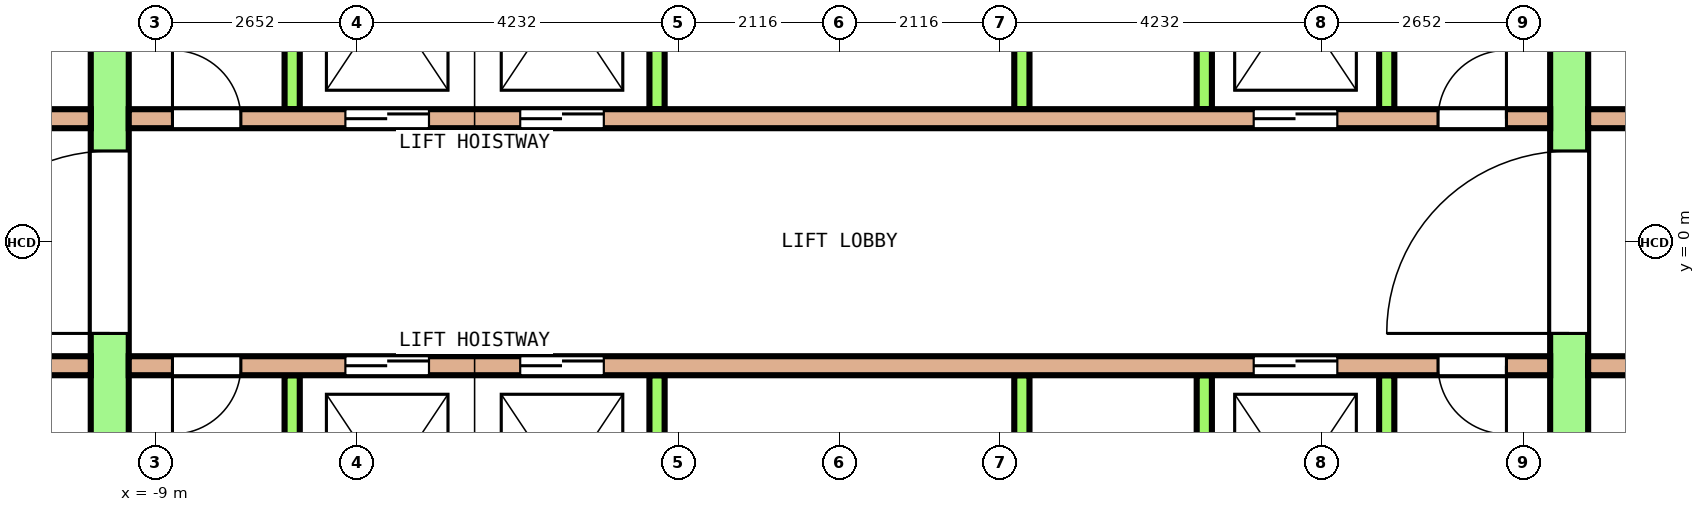
"""IFC4 building model, lengths in metres.
Left out: names, types, materials, properties, quantities, classifications, styles, units other than length and angle.
Written with IfcOpenShell. Run it as: python <this file> out.ifc"""

import sys

from ifc_helpers import new_model, si_unit, direction, frame, frame_2d, origin, place, context, subcontext, project, spatial, rectangle, extrude, element, fill, save


model = new_model("IFC4")
c1 = context("Model", 3, precision=1e-05, world=origin(), true_north=direction((0.0, 1.0)))
c2 = subcontext(c1, "Body", "Model", "MODEL_VIEW")
j1 = project(units=[si_unit("LENGTHUNIT", "METRE"), si_unit("PLANEANGLEUNIT", "RADIAN")], contexts=[c1])
p1 = place(None, origin())
s1 = spatial("IfcSite", under=j1, at=p1, CompositionType="ELEMENT")
p2 = place(p1, origin())
s2 = spatial("IfcBuilding", under=s1, at=p2, CompositionType="ELEMENT")
p3 = place(p2, frame((0.0, 0.0, 176.0)))
s3 = spatial("IfcBuildingStorey", under=s2, at=p3, CompositionType="ELEMENT", Elevation=176.0)
p4 = place(p3, frame((-9.6, -7.75, 0.0), z_axis=(0.0, 0.0, 1.0), x_axis=(0.0, 1.0, 0.0)))
e1 = element("IfcWall", 1, at=p4, inside=s3, PredefinedType="SHEAR", context=c2, shape_type="SweptSolid", body=[
    extrude(rectangle(XDim=15.5, YDim=0.5, at=frame_2d((7.75, 0.0))), origin(), (0.0, 0.0, 1.0), 4.1),
])
p5 = place(p4, frame((6.55, 0.0, 0.0)))
e2 = element("IfcOpeningElement", 2, at=p5, cuts=e1, PredefinedType="OPENING", context=c2, shape_type="SweptSolid", body=[
    extrude(rectangle(XDim=2.4, YDim=2.1, at=frame_2d((1.2, 1.05))), frame((0.0, 0.26, 0.0), z_axis=(0.0, -1.0, 0.0), x_axis=(1.0, 0.0, 0.0)), (0.0, 0.0, 1.0), 0.52),
])
p6 = place(p4, frame((13.45, 0.0, 0.0)))
e3 = element("IfcOpeningElement", 3, at=p6, cuts=e1, PredefinedType="OPENING", context=c2, shape_type="SweptSolid", body=[
    extrude(rectangle(XDim=1.2, YDim=2.1, at=frame_2d((0.6, 1.05))), frame((0.0, 0.26, 0.0), z_axis=(0.0, -1.0, 0.0), x_axis=(1.0, 0.0, 0.0)), (0.0, 0.0, 1.0), 0.52),
])
p7 = place(p4, frame((0.85, 0.0, 0.0)))
e4 = element("IfcOpeningElement", 4, at=p7, cuts=e1, PredefinedType="OPENING", context=c2, shape_type="SweptSolid", body=[
    extrude(rectangle(XDim=1.2, YDim=2.1, at=frame_2d((0.6, 1.05))), frame((0.0, 0.26, 0.0), z_axis=(0.0, -1.0, 0.0), x_axis=(1.0, 0.0, 0.0)), (0.0, 0.0, 1.0), 0.52),
])
p8 = place(p3, frame((9.6, -7.75, 0.0), z_axis=(0.0, 0.0, 1.0), x_axis=(0.0, 1.0, 0.0)))
e5 = element("IfcWall", 5, at=p8, inside=s3, PredefinedType="SHEAR", context=c2, shape_type="SweptSolid", body=[
    extrude(rectangle(XDim=15.5, YDim=0.5, at=frame_2d((7.75, 0.0))), origin(), (0.0, 0.0, 1.0), 4.1),
])
p9 = place(p8, frame((6.55, 0.0, 0.0)))
e6 = element("IfcOpeningElement", 6, at=p9, cuts=e5, PredefinedType="OPENING", context=c2, shape_type="SweptSolid", body=[
    extrude(rectangle(XDim=2.4, YDim=2.1, at=frame_2d((1.2, 1.05))), frame((0.0, 0.26, 0.0), z_axis=(0.0, -1.0, 0.0), x_axis=(1.0, 0.0, 0.0)), (0.0, 0.0, 1.0), 0.52),
])
p10 = place(p8, frame((13.45, 0.0, 0.0)))
e7 = element("IfcOpeningElement", 7, at=p10, cuts=e5, PredefinedType="OPENING", context=c2, shape_type="SweptSolid", body=[
    extrude(rectangle(XDim=1.2, YDim=2.1, at=frame_2d((0.6, 1.05))), frame((0.0, 0.26, 0.0), z_axis=(0.0, -1.0, 0.0), x_axis=(1.0, 0.0, 0.0)), (0.0, 0.0, 1.0), 0.52),
])
p11 = place(p8, frame((0.95, 0.0, 0.0)))
e8 = element("IfcOpeningElement", 8, at=p11, cuts=e5, PredefinedType="OPENING", context=c2, shape_type="SweptSolid", body=[
    extrude(rectangle(XDim=1.0, YDim=2.1, at=frame_2d((0.5, 1.05))), frame((0.0, 0.26, 0.0), z_axis=(0.0, -1.0, 0.0), x_axis=(1.0, 0.0, 0.0)), (0.0, 0.0, 1.0), 0.52),
])
p12 = place(p3, frame((-12.85, 1.625, 0.0), z_axis=(0.0, 0.0, 1.0), x_axis=(1.0, 0.0, 0.0)))
e9 = element("IfcWall", 9, at=p12, inside=s3, PredefinedType="SOLIDWALL", context=c2, shape_type="SweptSolid", body=[
    extrude(rectangle(XDim=3.0, YDim=0.25, at=frame_2d((1.5, 0.0))), origin(), (0.0, 0.0, 1.0), 4.1),
])
p13 = place(p12, frame((1.05, 0.0, 0.0)))
e10 = element("IfcOpeningElement", 10, at=p13, cuts=e9, PredefinedType="OPENING", context=c2, shape_type="SweptSolid", body=[
    extrude(rectangle(XDim=0.9, YDim=2.1, at=frame_2d((0.45, 1.05))), frame((0.0, 0.135, 0.0), z_axis=(0.0, -1.0, 0.0), x_axis=(1.0, 0.0, 0.0)), (0.0, 0.0, 1.0), 0.27),
])
p14 = place(p3, frame((-9.35, 1.625, 0.0), z_axis=(0.0, 0.0, 1.0), x_axis=(1.0, 0.0, 0.0)))
e11 = element("IfcWall", 11, at=p14, inside=s3, PredefinedType="SOLIDWALL", context=c2, shape_type="SweptSolid", body=[
    extrude(rectangle(XDim=18.7, YDim=0.25, at=frame_2d((9.35, 0.0))), origin(), (0.0, 0.0, 1.0), 4.1),
])
p15 = place(p14, frame((2.85, 0.0, 0.0)))
e12 = element("IfcOpeningElement", 12, at=p15, cuts=e11, PredefinedType="OPENING", context=c2, shape_type="SweptSolid", body=[
    extrude(rectangle(XDim=1.1, YDim=2.1, at=frame_2d((0.55, 1.05))), frame((0.0, 0.135, 0.0), z_axis=(0.0, -1.0, 0.0), x_axis=(1.0, 0.0, 0.0)), (0.0, 0.0, 1.0), 0.27),
])
p16 = place(p14, frame((5.15, 0.0, 0.0)))
e13 = element("IfcOpeningElement", 13, at=p16, cuts=e11, PredefinedType="OPENING", context=c2, shape_type="SweptSolid", body=[
    extrude(rectangle(XDim=1.1, YDim=2.1, at=frame_2d((0.55, 1.05))), frame((0.0, 0.135, 0.0), z_axis=(0.0, -1.0, 0.0), x_axis=(1.0, 0.0, 0.0)), (0.0, 0.0, 1.0), 0.27),
])
p17 = place(p14, frame((14.8, 0.0, 0.0)))
e14 = element("IfcOpeningElement", 14, at=p17, cuts=e11, PredefinedType="OPENING", context=c2, shape_type="SweptSolid", body=[
    extrude(rectangle(XDim=1.1, YDim=2.1, at=frame_2d((0.55, 1.05))), frame((0.0, 0.135, 0.0), z_axis=(0.0, -1.0, 0.0), x_axis=(1.0, 0.0, 0.0)), (0.0, 0.0, 1.0), 0.27),
])
p18 = place(p14, frame((0.575, 0.0, 0.0)))
e15 = element("IfcOpeningElement", 15, at=p18, cuts=e11, PredefinedType="OPENING", context=c2, shape_type="SweptSolid", body=[
    extrude(rectangle(XDim=0.9, YDim=2.1, at=frame_2d((0.45, 1.05))), frame((0.0, 0.135, 0.0), z_axis=(0.0, -1.0, 0.0), x_axis=(1.0, 0.0, 0.0)), (0.0, 0.0, 1.0), 0.27),
])
p19 = place(p14, frame((17.225, 0.0, 0.0)))
e16 = element("IfcOpeningElement", 16, at=p19, cuts=e11, PredefinedType="OPENING", context=c2, shape_type="SweptSolid", body=[
    extrude(rectangle(XDim=0.9, YDim=2.1, at=frame_2d((0.45, 1.05))), frame((0.0, 0.135, 0.0), z_axis=(0.0, -1.0, 0.0), x_axis=(1.0, 0.0, 0.0)), (0.0, 0.0, 1.0), 0.27),
])
p20 = place(p3, frame((9.85, 1.625, 0.0), z_axis=(0.0, 0.0, 1.0), x_axis=(1.0, 0.0, 0.0)))
e17 = element("IfcWall", 17, at=p20, inside=s3, PredefinedType="SOLIDWALL", context=c2, shape_type="SweptSolid", body=[
    extrude(rectangle(XDim=3.0, YDim=0.25, at=frame_2d((1.5, 0.0))), origin(), (0.0, 0.0, 1.0), 4.1),
])
p21 = place(p20, frame((1.05, 0.0, 0.0)))
e18 = element("IfcOpeningElement", 18, at=p21, cuts=e17, PredefinedType="OPENING", context=c2, shape_type="SweptSolid", body=[
    extrude(rectangle(XDim=0.9, YDim=2.1, at=frame_2d((0.45, 1.05))), frame((0.0, 0.135, 0.0), z_axis=(0.0, -1.0, 0.0), x_axis=(1.0, 0.0, 0.0)), (0.0, 0.0, 1.0), 0.27),
])
for number, where, z_axis, x_axis in (
    (19, (-7.2, 1.75, 0.0), (0.0, 0.0, 1.0), (0.0, 1.0, 0.0)),
    (20, (-2.4, 1.75, 0.0), (0.0, 0.0, 1.0), (0.0, 1.0, 0.0)),
    (21, (2.4, 1.75, 0.0), (0.0, 0.0, 1.0), (0.0, 1.0, 0.0)),
    (22, (4.8, 1.75, 0.0), (0.0, 0.0, 1.0), (0.0, 1.0, 0.0)),
    (23, (7.2, 1.75, 0.0), (0.0, 0.0, 1.0), (0.0, 1.0, 0.0)),
):
    element("IfcWall", number, at=place(p3, frame(where, z_axis=z_axis, x_axis=x_axis)), inside=s3, PredefinedType="SOLIDWALL", context=c2, shape_type="SweptSolid", body=[
        extrude(rectangle(XDim=2.9, YDim=0.2, at=frame_2d((1.45, 0.0))), origin(), (0.0, 0.0, 1.0), 4.1),
    ])
p22 = place(p3, frame((-12.85, -1.625, 0.0), z_axis=(0.0, 0.0, 1.0), x_axis=(1.0, 0.0, 0.0)))
e24 = element("IfcWall", 24, at=p22, inside=s3, PredefinedType="SOLIDWALL", context=c2, shape_type="SweptSolid", body=[
    extrude(rectangle(XDim=3.0, YDim=0.25, at=frame_2d((1.5, 0.0))), origin(), (0.0, 0.0, 1.0), 4.1),
])
p23 = place(p22, frame((1.05, 0.0, 0.0)))
e25 = element("IfcOpeningElement", 25, at=p23, cuts=e24, PredefinedType="OPENING", context=c2, shape_type="SweptSolid", body=[
    extrude(rectangle(XDim=0.9, YDim=2.1, at=frame_2d((0.45, 1.05))), frame((0.0, 0.135, 0.0), z_axis=(0.0, -1.0, 0.0), x_axis=(1.0, 0.0, 0.0)), (0.0, 0.0, 1.0), 0.27),
])
p24 = place(p3, frame((-9.35, -1.625, 0.0), z_axis=(0.0, 0.0, 1.0), x_axis=(1.0, 0.0, 0.0)))
e26 = element("IfcWall", 26, at=p24, inside=s3, PredefinedType="SOLIDWALL", context=c2, shape_type="SweptSolid", body=[
    extrude(rectangle(XDim=18.7, YDim=0.25, at=frame_2d((9.35, 0.0))), origin(), (0.0, 0.0, 1.0), 4.1),
])
p25 = place(p24, frame((2.85, 0.0, 0.0)))
e27 = element("IfcOpeningElement", 27, at=p25, cuts=e26, PredefinedType="OPENING", context=c2, shape_type="SweptSolid", body=[
    extrude(rectangle(XDim=1.1, YDim=2.1, at=frame_2d((0.55, 1.05))), frame((0.0, 0.135, 0.0), z_axis=(0.0, -1.0, 0.0), x_axis=(1.0, 0.0, 0.0)), (0.0, 0.0, 1.0), 0.27),
])
p26 = place(p24, frame((5.15, 0.0, 0.0)))
e28 = element("IfcOpeningElement", 28, at=p26, cuts=e26, PredefinedType="OPENING", context=c2, shape_type="SweptSolid", body=[
    extrude(rectangle(XDim=1.1, YDim=2.1, at=frame_2d((0.55, 1.05))), frame((0.0, 0.135, 0.0), z_axis=(0.0, -1.0, 0.0), x_axis=(1.0, 0.0, 0.0)), (0.0, 0.0, 1.0), 0.27),
])
p27 = place(p24, frame((14.8, 0.0, 0.0)))
e29 = element("IfcOpeningElement", 29, at=p27, cuts=e26, PredefinedType="OPENING", context=c2, shape_type="SweptSolid", body=[
    extrude(rectangle(XDim=1.1, YDim=2.1, at=frame_2d((0.55, 1.05))), frame((0.0, 0.135, 0.0), z_axis=(0.0, -1.0, 0.0), x_axis=(1.0, 0.0, 0.0)), (0.0, 0.0, 1.0), 0.27),
])
p28 = place(p24, frame((0.575, 0.0, 0.0)))
e30 = element("IfcOpeningElement", 30, at=p28, cuts=e26, PredefinedType="OPENING", context=c2, shape_type="SweptSolid", body=[
    extrude(rectangle(XDim=0.9, YDim=2.1, at=frame_2d((0.45, 1.05))), frame((0.0, 0.135, 0.0), z_axis=(0.0, -1.0, 0.0), x_axis=(1.0, 0.0, 0.0)), (0.0, 0.0, 1.0), 0.27),
])
p29 = place(p24, frame((17.225, 0.0, 0.0)))
e31 = element("IfcOpeningElement", 31, at=p29, cuts=e26, PredefinedType="OPENING", context=c2, shape_type="SweptSolid", body=[
    extrude(rectangle(XDim=0.9, YDim=2.1, at=frame_2d((0.45, 1.05))), frame((0.0, 0.135, 0.0), z_axis=(0.0, -1.0, 0.0), x_axis=(1.0, 0.0, 0.0)), (0.0, 0.0, 1.0), 0.27),
])
p30 = place(p3, frame((9.85, -1.625, 0.0), z_axis=(0.0, 0.0, 1.0), x_axis=(1.0, 0.0, 0.0)))
e32 = element("IfcWall", 32, at=p30, inside=s3, PredefinedType="SOLIDWALL", context=c2, shape_type="SweptSolid", body=[
    extrude(rectangle(XDim=3.0, YDim=0.25, at=frame_2d((1.5, 0.0))), origin(), (0.0, 0.0, 1.0), 4.1),
])
p31 = place(p30, frame((1.05, 0.0, 0.0)))
e33 = element("IfcOpeningElement", 33, at=p31, cuts=e32, PredefinedType="OPENING", context=c2, shape_type="SweptSolid", body=[
    extrude(rectangle(XDim=0.9, YDim=2.1, at=frame_2d((0.45, 1.05))), frame((0.0, 0.135, 0.0), z_axis=(0.0, -1.0, 0.0), x_axis=(1.0, 0.0, 0.0)), (0.0, 0.0, 1.0), 0.27),
])
for number, where, z_axis, x_axis in (
    (34, (-7.2, -4.65, 0.0), (0.0, 0.0, 1.0), (0.0, 1.0, 0.0)),
    (35, (-2.4, -4.65, 0.0), (0.0, 0.0, 1.0), (0.0, 1.0, 0.0)),
    (36, (2.4, -4.65, 0.0), (0.0, 0.0, 1.0), (0.0, 1.0, 0.0)),
    (37, (4.8, -4.65, 0.0), (0.0, 0.0, 1.0), (0.0, 1.0, 0.0)),
    (38, (7.2, -4.65, 0.0), (0.0, 0.0, 1.0), (0.0, 1.0, 0.0)),
):
    element("IfcWall", number, at=place(p3, frame(where, z_axis=z_axis, x_axis=x_axis)), inside=s3, PredefinedType="SOLIDWALL", context=c2, shape_type="SweptSolid", body=[
        extrude(rectangle(XDim=2.9, YDim=0.2, at=frame_2d((1.45, 0.0))), origin(), (0.0, 0.0, 1.0), 4.1),
    ])
p32 = place(p15, origin())
e39 = element("IfcDoor", 39, at=p32, inside=s3, OperationType="DOUBLE_DOOR_SLIDING", PredefinedType="DOOR", context=c2, shape_type="SweptSolid", body=[
    extrude(rectangle(XDim=1.1, YDim=2.1, at=frame_2d((0.55, 1.05))), frame((0.0, 0.075, 0.0), z_axis=(0.0, -1.0, 0.0), x_axis=(1.0, 0.0, 0.0)), (0.0, 0.0, 1.0), 0.15),
])
fill(e12, e39)
p33 = place(p16, origin())
e40 = element("IfcDoor", 40, at=p33, inside=s3, OperationType="DOUBLE_DOOR_SLIDING", PredefinedType="DOOR", context=c2, shape_type="SweptSolid", body=[
    extrude(rectangle(XDim=1.1, YDim=2.1, at=frame_2d((0.55, 1.05))), frame((0.0, 0.075, 0.0), z_axis=(0.0, -1.0, 0.0), x_axis=(1.0, 0.0, 0.0)), (0.0, 0.0, 1.0), 0.15),
])
fill(e13, e40)
p34 = place(p17, origin())
e41 = element("IfcDoor", 41, at=p34, inside=s3, OperationType="DOUBLE_DOOR_SLIDING", PredefinedType="DOOR", context=c2, shape_type="SweptSolid", body=[
    extrude(rectangle(XDim=1.1, YDim=2.1, at=frame_2d((0.55, 1.05))), frame((0.0, 0.075, 0.0), z_axis=(0.0, -1.0, 0.0), x_axis=(1.0, 0.0, 0.0)), (0.0, 0.0, 1.0), 0.15),
])
fill(e14, e41)
p35 = place(p25, origin())
e42 = element("IfcDoor", 42, at=p35, inside=s3, OperationType="DOUBLE_DOOR_SLIDING", PredefinedType="DOOR", context=c2, shape_type="SweptSolid", body=[
    extrude(rectangle(XDim=1.1, YDim=2.1, at=frame_2d((0.55, 1.05))), frame((0.0, 0.075, 0.0), z_axis=(0.0, -1.0, 0.0), x_axis=(1.0, 0.0, 0.0)), (0.0, 0.0, 1.0), 0.15),
])
fill(e27, e42)
p36 = place(p26, origin())
e43 = element("IfcDoor", 43, at=p36, inside=s3, OperationType="DOUBLE_DOOR_SLIDING", PredefinedType="DOOR", context=c2, shape_type="SweptSolid", body=[
    extrude(rectangle(XDim=1.1, YDim=2.1, at=frame_2d((0.55, 1.05))), frame((0.0, 0.075, 0.0), z_axis=(0.0, -1.0, 0.0), x_axis=(1.0, 0.0, 0.0)), (0.0, 0.0, 1.0), 0.15),
])
fill(e28, e43)
p37 = place(p27, origin())
e44 = element("IfcDoor", 44, at=p37, inside=s3, OperationType="DOUBLE_DOOR_SLIDING", PredefinedType="DOOR", context=c2, shape_type="SweptSolid", body=[
    extrude(rectangle(XDim=1.1, YDim=2.1, at=frame_2d((0.55, 1.05))), frame((0.0, 0.075, 0.0), z_axis=(0.0, -1.0, 0.0), x_axis=(1.0, 0.0, 0.0)), (0.0, 0.0, 1.0), 0.15),
])
fill(e29, e44)
p38 = place(p5, origin())
e45 = element("IfcDoor", 45, at=p38, inside=s3, OperationType="DOUBLE_DOOR_SINGLE_SWING", PredefinedType="DOOR", context=c2, shape_type="SweptSolid", body=[
    extrude(rectangle(XDim=2.4, YDim=2.1, at=frame_2d((1.2, 1.05))), frame((0.0, 0.2, 0.0), z_axis=(0.0, -1.0, 0.0), x_axis=(1.0, 0.0, 0.0)), (0.0, 0.0, 1.0), 0.4),
])
fill(e2, e45)
p39 = place(p9, origin())
e46 = element("IfcDoor", 46, at=p39, inside=s3, OperationType="DOUBLE_DOOR_SINGLE_SWING", PredefinedType="DOOR", context=c2, shape_type="SweptSolid", body=[
    extrude(rectangle(XDim=2.4, YDim=2.1, at=frame_2d((1.2, 1.05))), frame((0.0, 0.2, 0.0), z_axis=(0.0, -1.0, 0.0), x_axis=(1.0, 0.0, 0.0)), (0.0, 0.0, 1.0), 0.4),
])
fill(e6, e46)
p40 = place(p18, origin())
e47 = element("IfcDoor", 47, at=p40, inside=s3, OperationType="SINGLE_SWING_RIGHT", PredefinedType="DOOR", context=c2, shape_type="SweptSolid", body=[
    extrude(rectangle(XDim=0.9, YDim=2.1, at=frame_2d((0.45, 1.05))), frame((0.0, 0.075, 0.0), z_axis=(0.0, -1.0, 0.0), x_axis=(1.0, 0.0, 0.0)), (0.0, 0.0, 1.0), 0.15),
])
fill(e15, e47)
p41 = place(p19, origin())
e48 = element("IfcDoor", 48, at=p41, inside=s3, OperationType="SINGLE_SWING_LEFT", PredefinedType="DOOR", context=c2, shape_type="SweptSolid", body=[
    extrude(rectangle(XDim=0.9, YDim=2.1, at=frame_2d((0.45, 1.05))), frame((0.0, 0.075, 0.0), z_axis=(0.0, -1.0, 0.0), x_axis=(1.0, 0.0, 0.0)), (0.0, 0.0, 1.0), 0.15),
])
fill(e16, e48)
p42 = place(p28, origin())
e49 = element("IfcDoor", 49, at=p42, inside=s3, OperationType="SINGLE_SWING_RIGHT", PredefinedType="DOOR", context=c2, shape_type="SweptSolid", body=[
    extrude(rectangle(XDim=0.9, YDim=2.1, at=frame_2d((0.45, 1.05))), frame((0.0, 0.075, 0.0), z_axis=(0.0, -1.0, 0.0), x_axis=(1.0, 0.0, 0.0)), (0.0, 0.0, 1.0), 0.15),
])
fill(e30, e49)
p43 = place(p29, origin())
e50 = element("IfcDoor", 50, at=p43, inside=s3, OperationType="SINGLE_SWING_LEFT", PredefinedType="DOOR", context=c2, shape_type="SweptSolid", body=[
    extrude(rectangle(XDim=0.9, YDim=2.1, at=frame_2d((0.45, 1.05))), frame((0.0, 0.075, 0.0), z_axis=(0.0, -1.0, 0.0), x_axis=(1.0, 0.0, 0.0)), (0.0, 0.0, 1.0), 0.15),
])
fill(e31, e50)
save(model, sys.argv[1])
